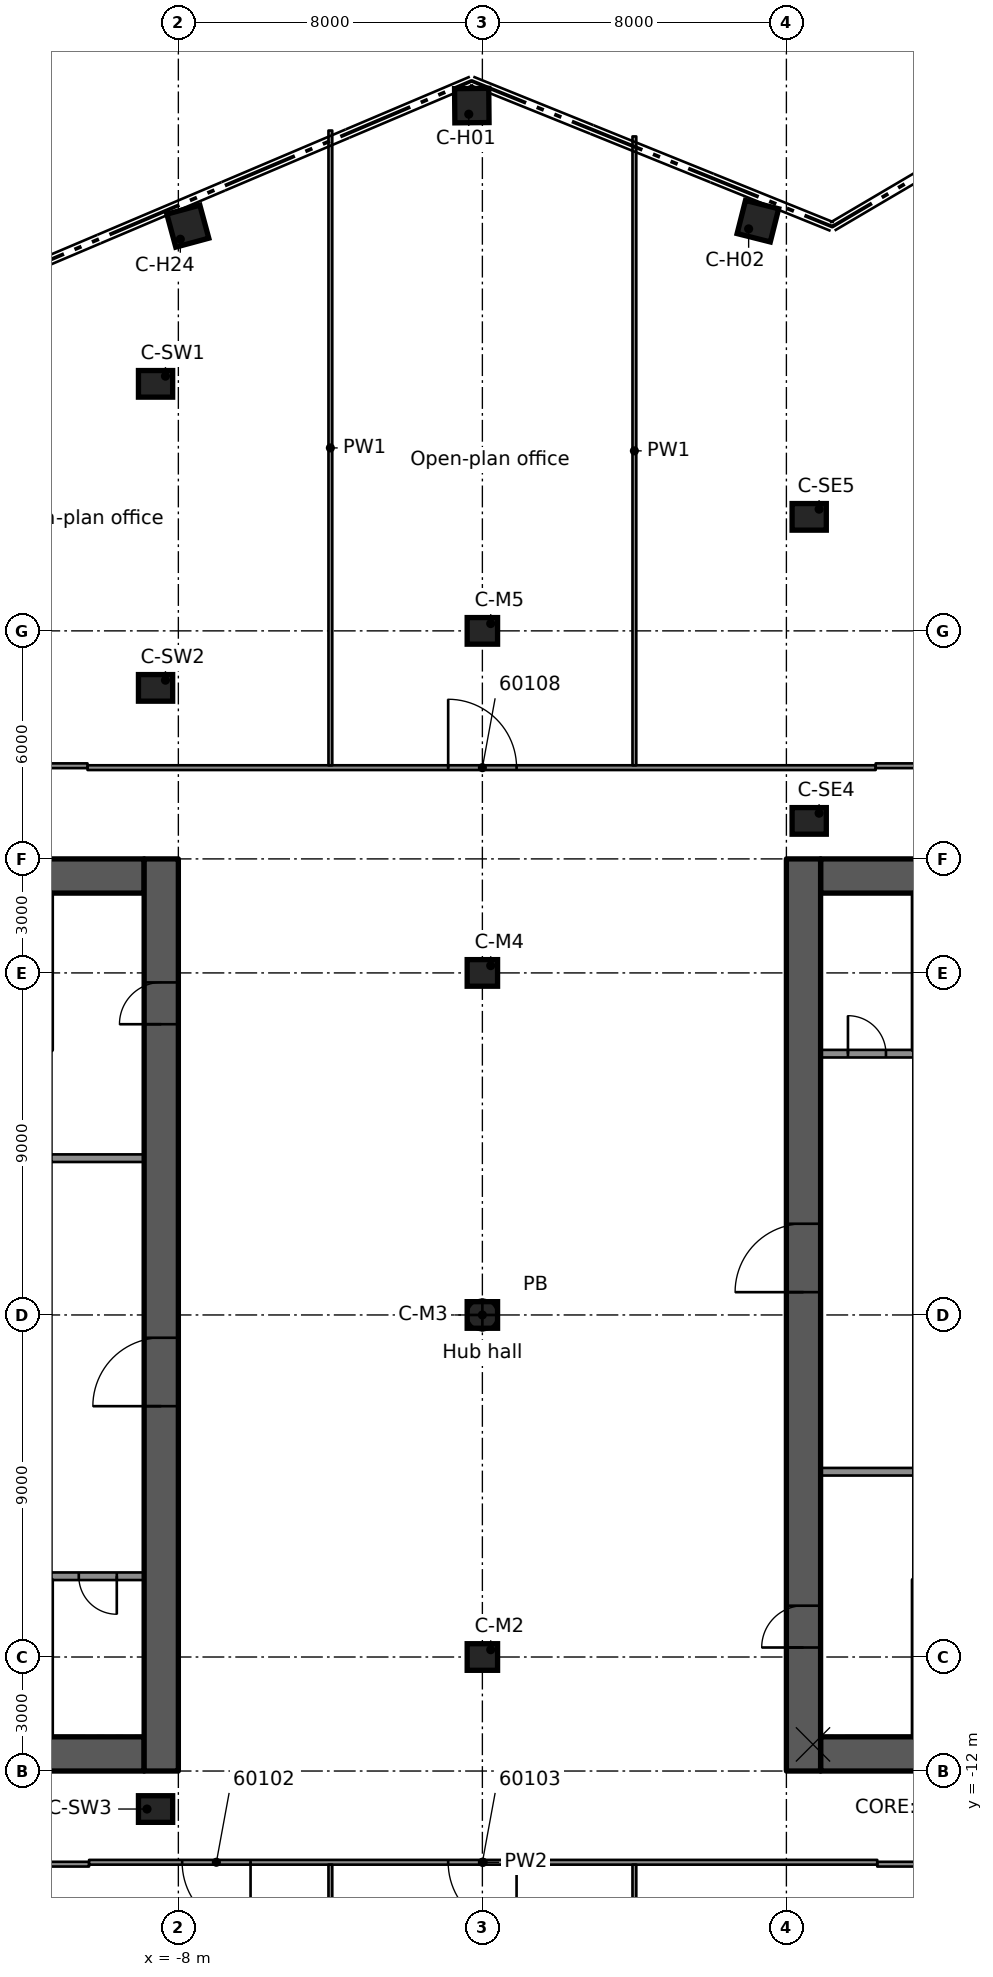
"""IFC4 building model, lengths in metres.
Left out: names, types, materials, properties, quantities, classifications, styles, units other than length and angle.
Written with IfcOpenShell. Run it as: python <this file> out.ifc"""

import sys

from ifc_helpers import new_model, si_unit, direction, frame, frame_2d, origin, origin_2d, place, context, subcontext, project, spatial, rectangle, extrude, element, fill, save


model = new_model("IFC4")
c1 = context("Model", 3, precision=1e-05, world=origin(), true_north=direction((0.0, 1.0)))
c2 = subcontext(c1, "Body", "Model", "MODEL_VIEW")
j1 = project(units=[si_unit("LENGTHUNIT", "METRE"), si_unit("PLANEANGLEUNIT", "RADIAN")], contexts=[c1])
p1 = place(None, origin())
s1 = spatial("IfcSite", under=j1, at=p1, CompositionType="ELEMENT")
p2 = place(p1, origin())
s2 = spatial("IfcBuilding", under=s1, at=p2, CompositionType="ELEMENT")
p3 = place(p2, frame((0.0, 0.0, 292.9)))
s3 = spatial("IfcBuildingStorey", under=s2, at=p3, CompositionType="ELEMENT", Elevation=292.9)
p4 = place(p3, frame((-18.1, 11.55, 0.0), z_axis=(0.0, 0.0, 1.0), x_axis=(1.0, 0.0, 0.0)))
e1 = element("IfcWall", 1, at=p4, inside=s3, PredefinedType="SHEAR", context=c2, shape_type="SweptSolid", body=[
    extrude(rectangle(XDim=9.2, YDim=0.9, at=frame_2d((4.6, 0.0))), origin(), (0.0, 0.0, 1.0), 3.5),
])
p5 = place(p4, frame((5.1, 0.0, 0.0)))
e2 = element("IfcOpeningElement", 2, at=p5, cuts=e1, PredefinedType="OPENING", context=c2, shape_type="SweptSolid", body=[
    extrude(rectangle(XDim=1.1, YDim=2.1, at=frame_2d((0.55, 1.05))), frame((0.0, 0.46, 0.0), z_axis=(0.0, -1.0, 0.0), x_axis=(1.0, 0.0, 0.0)), (0.0, 0.0, 1.0), 0.92),
])
p6 = place(p3, frame((-18.1, -11.55, 0.0), z_axis=(0.0, 0.0, 1.0), x_axis=(1.0, 0.0, 0.0)))
e3 = element("IfcWall", 3, at=p6, inside=s3, PredefinedType="SHEAR", context=c2, shape_type="SweptSolid", body=[
    extrude(rectangle(XDim=9.2, YDim=0.9, at=frame_2d((4.6, 0.0))), origin(), (0.0, 0.0, 1.0), 3.5),
])
p7 = place(p6, frame((5.1, 0.0, 0.0)))
e4 = element("IfcOpeningElement", 4, at=p7, cuts=e3, PredefinedType="OPENING", context=c2, shape_type="SweptSolid", body=[
    extrude(rectangle(XDim=1.1, YDim=2.1, at=frame_2d((0.55, 1.05))), frame((0.0, 0.46, 0.0), z_axis=(0.0, -1.0, 0.0), x_axis=(1.0, 0.0, 0.0)), (0.0, 0.0, 1.0), 0.92),
])
p8 = place(p3, frame((-8.45, -12.0, 0.0), z_axis=(0.0, 0.0, 1.0), x_axis=(0.0, 1.0, 0.0)))
e5 = element("IfcWall", 5, at=p8, inside=s3, PredefinedType="SHEAR", context=c2, shape_type="SweptSolid", body=[
    extrude(rectangle(XDim=24.0, YDim=0.9, at=frame_2d((12.0, 0.0))), origin(), (0.0, 0.0, 1.0), 3.5),
])
p9 = place(p8, frame((9.6, 0.0, 0.0)))
e6 = element("IfcOpeningElement", 6, at=p9, cuts=e5, PredefinedType="OPENING", context=c2, shape_type="SweptSolid", body=[
    extrude(rectangle(XDim=1.8, YDim=2.1, at=frame_2d((0.9, 1.05))), frame((0.0, 0.46, 0.0), z_axis=(0.0, -1.0, 0.0), x_axis=(1.0, 0.0, 0.0)), (0.0, 0.0, 1.0), 0.92),
])
p10 = place(p8, frame((19.65, 0.0, 0.0)))
e7 = element("IfcOpeningElement", 7, at=p10, cuts=e5, PredefinedType="OPENING", context=c2, shape_type="SweptSolid", body=[
    extrude(rectangle(XDim=1.1, YDim=2.1, at=frame_2d((0.55, 1.05))), frame((0.0, 0.46, 0.0), z_axis=(0.0, -1.0, 0.0), x_axis=(1.0, 0.0, 0.0)), (0.0, 0.0, 1.0), 0.92),
])
p11 = place(p3, frame((8.9, 11.55, 0.0), z_axis=(0.0, 0.0, 1.0), x_axis=(1.0, 0.0, 0.0)))
e8 = element("IfcWall", 8, at=p11, inside=s3, PredefinedType="SHEAR", context=c2, shape_type="SweptSolid", body=[
    extrude(rectangle(XDim=9.2, YDim=0.9, at=frame_2d((4.6, 0.0))), origin(), (0.0, 0.0, 1.0), 3.5),
])
p12 = place(p11, frame((3.0, 0.0, 0.0)))
e9 = element("IfcOpeningElement", 9, at=p12, cuts=e8, PredefinedType="OPENING", context=c2, shape_type="SweptSolid", body=[
    extrude(rectangle(XDim=1.1, YDim=2.1, at=frame_2d((0.55, 1.05))), frame((0.0, 0.46, 0.0), z_axis=(0.0, -1.0, 0.0), x_axis=(1.0, 0.0, 0.0)), (0.0, 0.0, 1.0), 0.92),
])
p13 = place(p3, frame((8.9, -11.55, 0.0), z_axis=(0.0, 0.0, 1.0), x_axis=(1.0, 0.0, 0.0)))
e10 = element("IfcWall", 10, at=p13, inside=s3, PredefinedType="SHEAR", context=c2, shape_type="SweptSolid", body=[
    extrude(rectangle(XDim=9.2, YDim=0.9, at=frame_2d((4.6, 0.0))), origin(), (0.0, 0.0, 1.0), 3.5),
])
p14 = place(p13, frame((3.0, 0.0, 0.0)))
e11 = element("IfcOpeningElement", 11, at=p14, cuts=e10, PredefinedType="OPENING", context=c2, shape_type="SweptSolid", body=[
    extrude(rectangle(XDim=1.1, YDim=2.1, at=frame_2d((0.55, 1.05))), frame((0.0, 0.46, 0.0), z_axis=(0.0, -1.0, 0.0), x_axis=(1.0, 0.0, 0.0)), (0.0, 0.0, 1.0), 0.92),
])
p15 = place(p3, frame((8.45, -12.0, 0.0), z_axis=(0.0, 0.0, 1.0), x_axis=(0.0, 1.0, 0.0)))
e12 = element("IfcWall", 12, at=p15, inside=s3, PredefinedType="SHEAR", context=c2, shape_type="SweptSolid", body=[
    extrude(rectangle(XDim=24.0, YDim=0.9, at=frame_2d((12.0, 0.0))), origin(), (0.0, 0.0, 1.0), 3.5),
])
p16 = place(p15, frame((12.6, 0.0, 0.0)))
e13 = element("IfcOpeningElement", 13, at=p16, cuts=e12, PredefinedType="OPENING", context=c2, shape_type="SweptSolid", body=[
    extrude(rectangle(XDim=1.8, YDim=2.1, at=frame_2d((0.9, 1.05))), frame((0.0, 0.46, 0.0), z_axis=(0.0, -1.0, 0.0), x_axis=(1.0, 0.0, 0.0)), (0.0, 0.0, 1.0), 0.92),
])
p17 = place(p15, frame((3.25, 0.0, 0.0)))
e14 = element("IfcOpeningElement", 14, at=p17, cuts=e12, PredefinedType="OPENING", context=c2, shape_type="SweptSolid", body=[
    extrude(rectangle(XDim=1.1, YDim=2.1, at=frame_2d((0.55, 1.05))), frame((0.0, 0.46, 0.0), z_axis=(0.0, -1.0, 0.0), x_axis=(1.0, 0.0, 0.0)), (0.0, 0.0, 1.0), 0.92),
])
for number, where, z_axis, x_axis in (
    (15, (-0.278, 31.821, 0.0), (0.0, 0.0, 1.0), (-0.009, 1.0, 0.0)),
    (16, (7.25, 28.78, 0.0), (0.0, 0.0, 1.0), (0.244, 0.97, 0.0)),
    (17, (-7.751, 28.649, 0.0), (0.0, 0.0, 1.0), (-0.261, 0.965, 0.0)),
):
    element("IfcColumn", number, at=place(p3, frame(where, z_axis=z_axis, x_axis=x_axis)), inside=s3, PredefinedType="COLUMN", context=c2, shape_type="SweptSolid", body=[
        extrude(rectangle(XDim=0.9, YDim=0.9, at=origin_2d()), origin(), (0.0, 0.0, 1.0), 3.5),
    ])
for number, where, z_axis, x_axis in (
    (18, (0.0, -9.0, 0.0), (0.0, 0.0, 1.0), (1.0, 0.0, 0.0)),
    (19, (0.0, 0.0, 0.0), (0.0, 0.0, 1.0), (1.0, 0.0, 0.0)),
    (20, (0.0, 9.0, 0.0), (0.0, 0.0, 1.0), (1.0, 0.0, 0.0)),
    (21, (0.0, 18.0, 0.0), (0.0, 0.0, 1.0), (1.0, 0.0, 0.0)),
):
    element("IfcColumn", number, at=place(p3, frame(where, z_axis=z_axis, x_axis=x_axis)), inside=s3, PredefinedType="COLUMN", context=c2, shape_type="SweptSolid", body=[
        extrude(rectangle(XDim=0.8, YDim=0.7, at=origin_2d()), origin(), (0.0, 0.0, 1.0), 3.5),
    ])
for number, where, z_axis, x_axis in (
    (22, (8.6, 13.0, 0.0), (0.0, 0.0, 1.0), (1.0, 0.0, 0.0)),
    (23, (8.6, 21.0, 0.0), (0.0, 0.0, 1.0), (1.0, 0.0, 0.0)),
    (24, (-8.6, 24.5, 0.0), (0.0, 0.0, 1.0), (1.0, 0.0, 0.0)),
    (25, (-8.6, 16.5, 0.0), (0.0, 0.0, 1.0), (1.0, 0.0, 0.0)),
    (26, (-8.6, -13.0, 0.0), (0.0, 0.0, 1.0), (1.0, 0.0, 0.0)),
):
    element("IfcColumn", number, at=place(p3, frame(where, z_axis=z_axis, x_axis=x_axis)), inside=s3, PredefinedType="COLUMN", context=c2, shape_type="SweptSolid", body=[
        extrude(rectangle(XDim=0.9, YDim=0.7, at=origin_2d()), origin(), (0.0, 0.0, 1.0), 3.5),
    ])
p18 = place(p3, frame((-8.9, 4.125, 0.0), z_axis=(0.0, 0.0, 1.0), x_axis=(-1.0, 0.0, 0.0)))
e27 = element("IfcWall", 27, at=p18, inside=s3, PredefinedType="PARTITIONING", context=c2, shape_type="SweptSolid", body=[
    extrude(rectangle(XDim=2.44, YDim=0.2, at=frame_2d((1.22, 0.0))), origin(), (0.0, 0.0, 1.0), 3.09),
])
p19 = place(p3, frame((-8.9, -6.875, 0.0), z_axis=(0.0, 0.0, 1.0), x_axis=(-1.0, 0.0, 0.0)))
e28 = element("IfcWall", 28, at=p19, inside=s3, PredefinedType="PARTITIONING", context=c2, shape_type="SweptSolid", body=[
    extrude(rectangle(XDim=2.44, YDim=0.2, at=frame_2d((1.22, 0.0))), origin(), (0.0, 0.0, 1.0), 3.09),
])
p20 = place(p19, frame((0.72, 0.0, 0.0)))
e29 = element("IfcOpeningElement", 29, at=p20, cuts=e28, PredefinedType="OPENING", context=c2, shape_type="SweptSolid", body=[
    extrude(rectangle(XDim=1.0, YDim=2.1, at=frame_2d((0.5, 1.05))), frame((0.0, 0.11, 0.0), z_axis=(0.0, -1.0, 0.0), x_axis=(1.0, 0.0, 0.0)), (0.0, 0.0, 1.0), 0.22),
])
p21 = place(p3, frame((8.9, -4.125, 0.0), z_axis=(0.0, 0.0, 1.0), x_axis=(1.0, 0.0, 0.0)))
e30 = element("IfcWall", 30, at=p21, inside=s3, PredefinedType="PARTITIONING", context=c2, shape_type="SweptSolid", body=[
    extrude(rectangle(XDim=2.44, YDim=0.2, at=frame_2d((1.22, 0.0))), origin(), (0.0, 0.0, 1.0), 3.09),
])
p22 = place(p3, frame((8.9, 6.875, 0.0), z_axis=(0.0, 0.0, 1.0), x_axis=(1.0, 0.0, 0.0)))
e31 = element("IfcWall", 31, at=p22, inside=s3, PredefinedType="PARTITIONING", context=c2, shape_type="SweptSolid", body=[
    extrude(rectangle(XDim=2.44, YDim=0.2, at=frame_2d((1.22, 0.0))), origin(), (0.0, 0.0, 1.0), 3.09),
])
p23 = place(p22, frame((0.72, 0.0, 0.0)))
e32 = element("IfcOpeningElement", 32, at=p23, cuts=e31, PredefinedType="OPENING", context=c2, shape_type="SweptSolid", body=[
    extrude(rectangle(XDim=1.0, YDim=2.1, at=frame_2d((0.5, 1.05))), frame((0.0, 0.11, 0.0), z_axis=(0.0, -1.0, 0.0), x_axis=(1.0, 0.0, 0.0)), (0.0, 0.0, 1.0), 0.22),
])
p24 = place(p3, frame((-10.35, -14.451, 0.0), z_axis=(0.0, 0.0, 1.0), x_axis=(-1.0, 0.0, 0.0)))
e33 = element("IfcWall", 33, at=p24, inside=s3, PredefinedType="PARTITIONING", context=c2, shape_type="SweptSolid", body=[
    extrude(rectangle(XDim=11.037, YDim=0.125, at=frame_2d((5.519, 0.0))), origin(), (0.0, 0.0, 1.0), 3.08),
])
p25 = place(p24, frame((4.6, 0.0, 0.0)))
e34 = element("IfcOpeningElement", 34, at=p25, cuts=e33, PredefinedType="OPENING", context=c2, shape_type="SweptSolid", body=[
    extrude(rectangle(XDim=1.8, YDim=2.1, at=frame_2d((0.9, 1.05))), frame((0.0, 0.073, 0.0), z_axis=(0.0, -1.0, 0.0), x_axis=(1.0, 0.0, 0.0)), (0.0, 0.0, 1.0), 0.145),
])
p26 = place(p3, frame((21.387, -14.451, 0.0), z_axis=(0.0, 0.0, 1.0), x_axis=(-1.0, 0.0, 0.0)))
e35 = element("IfcWall", 35, at=p26, inside=s3, PredefinedType="PARTITIONING", context=c2, shape_type="SweptSolid", body=[
    extrude(rectangle(XDim=10.996, YDim=0.125, at=frame_2d((5.498, 0.0))), origin(), (0.0, 0.0, 1.0), 3.08),
])
p27 = place(p26, frame((5.038, 0.0, 0.0)))
e36 = element("IfcOpeningElement", 36, at=p27, cuts=e35, PredefinedType="OPENING", context=c2, shape_type="SweptSolid", body=[
    extrude(rectangle(XDim=0.9, YDim=2.1, at=frame_2d((0.45, 1.05))), frame((0.0, 0.073, 0.0), z_axis=(0.0, -1.0, 0.0), x_axis=(1.0, 0.0, 0.0)), (0.0, 0.0, 1.0), 0.145),
])
p28 = place(p3, frame((10.391, -14.401, 0.0), z_axis=(0.0, 0.0, 1.0), x_axis=(-1.0, 0.0, 0.0)))
e37 = element("IfcWall", 37, at=p28, inside=s3, PredefinedType="PARTITIONING", context=c2, shape_type="SweptSolid", body=[
    extrude(rectangle(XDim=20.74, YDim=0.125, at=frame_2d((10.37, 0.0))), origin(), (0.0, 0.0, 1.0), 3.08),
])
p29 = place(p28, frame((16.491, 0.0, 0.0)))
e38 = element("IfcOpeningElement", 38, at=p29, cuts=e37, PredefinedType="OPENING", context=c2, shape_type="SweptSolid", body=[
    extrude(rectangle(XDim=1.8, YDim=2.1, at=frame_2d((0.9, 1.05))), frame((0.0, 0.073, 0.0), z_axis=(0.0, -1.0, 0.0), x_axis=(1.0, 0.0, 0.0)), (0.0, 0.0, 1.0), 0.145),
])
p30 = place(p28, frame((9.491, 0.0, 0.0)))
e39 = element("IfcOpeningElement", 39, at=p30, cuts=e37, PredefinedType="OPENING", context=c2, shape_type="SweptSolid", body=[
    extrude(rectangle(XDim=1.8, YDim=2.1, at=frame_2d((0.9, 1.05))), frame((0.0, 0.073, 0.0), z_axis=(0.0, -1.0, 0.0), x_axis=(1.0, 0.0, 0.0)), (0.0, 0.0, 1.0), 0.145),
])
p31 = place(p3, frame((-10.39, 14.401, 0.0), z_axis=(0.0, 0.0, 1.0), x_axis=(1.0, 0.0, 0.0)))
e40 = element("IfcWall", 40, at=p31, inside=s3, PredefinedType="PARTITIONING", context=c2, shape_type="SweptSolid", body=[
    extrude(rectangle(XDim=20.739, YDim=0.125, at=frame_2d((10.37, 0.0))), origin(), (0.0, 0.0, 1.0), 3.08),
])
p32 = place(p31, frame((9.49, 0.0, 0.0)))
e41 = element("IfcOpeningElement", 41, at=p32, cuts=e40, PredefinedType="OPENING", context=c2, shape_type="SweptSolid", body=[
    extrude(rectangle(XDim=1.8, YDim=2.1, at=frame_2d((0.9, 1.05))), frame((0.0, 0.073, 0.0), z_axis=(0.0, -1.0, 0.0), x_axis=(1.0, 0.0, 0.0)), (0.0, 0.0, 1.0), 0.145),
])
p33 = place(p3, frame((-21.387, 14.451, 0.0), z_axis=(0.0, 0.0, 1.0), x_axis=(1.0, 0.0, 0.0)))
e42 = element("IfcWall", 42, at=p33, inside=s3, PredefinedType="PARTITIONING", context=c2, shape_type="SweptSolid", body=[
    extrude(rectangle(XDim=10.996, YDim=0.125, at=frame_2d((5.498, 0.0))), origin(), (0.0, 0.0, 1.0), 3.08),
])
p34 = place(p33, frame((4.538, 0.0, 0.0)))
e43 = element("IfcOpeningElement", 43, at=p34, cuts=e42, PredefinedType="OPENING", context=c2, shape_type="SweptSolid", body=[
    extrude(rectangle(XDim=1.8, YDim=2.1, at=frame_2d((0.9, 1.05))), frame((0.0, 0.073, 0.0), z_axis=(0.0, -1.0, 0.0), x_axis=(1.0, 0.0, 0.0)), (0.0, 0.0, 1.0), 0.145),
])
p35 = place(p3, frame((10.35, 14.451, 0.0), z_axis=(0.0, 0.0, 1.0), x_axis=(1.0, 0.0, 0.0)))
e44 = element("IfcWall", 44, at=p35, inside=s3, PredefinedType="PARTITIONING", context=c2, shape_type="SweptSolid", body=[
    extrude(rectangle(XDim=11.037, YDim=0.125, at=frame_2d((5.519, 0.0))), origin(), (0.0, 0.0, 1.0), 3.08),
])
p36 = place(p35, frame((4.6, 0.0, 0.0)))
e45 = element("IfcOpeningElement", 45, at=p36, cuts=e44, PredefinedType="OPENING", context=c2, shape_type="SweptSolid", body=[
    extrude(rectangle(XDim=1.8, YDim=2.1, at=frame_2d((0.9, 1.05))), frame((0.0, 0.073, 0.0), z_axis=(0.0, -1.0, 0.0), x_axis=(1.0, 0.0, 0.0)), (0.0, 0.0, 1.0), 0.145),
])
p37 = place(p3, frame((4.0, -34.952, 0.0), z_axis=(0.0, 0.0, 1.0), x_axis=(0.0, 1.0, 0.0)))
e46 = element("IfcWall", 46, at=p37, inside=s3, PredefinedType="PARTITIONING", context=c2, shape_type="SweptSolid", body=[
    extrude(rectangle(XDim=20.489, YDim=0.1, at=frame_2d((10.245, 0.0))), origin(), (0.0, 0.0, 1.0), 2.445),
])
p38 = place(p3, frame((4.0, 14.463, 0.0), z_axis=(0.0, 0.0, 1.0), x_axis=(0.0, 1.0, 0.0)))
e47 = element("IfcWall", 47, at=p38, inside=s3, PredefinedType="PARTITIONING", context=c2, shape_type="SweptSolid", body=[
    extrude(rectangle(XDim=16.547, YDim=0.1, at=frame_2d((8.273, 0.0))), origin(), (0.0, 0.0, 1.0), 3.08),
])
p39 = place(p3, frame((-4.0, -36.532, 0.0), z_axis=(0.0, 0.0, 1.0), x_axis=(0.0, 1.0, 0.0)))
e48 = element("IfcWall", 48, at=p39, inside=s3, PredefinedType="PARTITIONING", context=c2, shape_type="SweptSolid", body=[
    extrude(rectangle(XDim=22.069, YDim=0.1, at=frame_2d((11.035, 0.0))), origin(), (0.0, 0.0, 1.0), 2.445),
])
p40 = place(p3, frame((-4.0, 14.463, 0.0), z_axis=(0.0, 0.0, 1.0), x_axis=(0.0, 1.0, 0.0)))
e49 = element("IfcWall", 49, at=p40, inside=s3, PredefinedType="PARTITIONING", context=c2, shape_type="SweptSolid", body=[
    extrude(rectangle(XDim=16.702, YDim=0.1, at=frame_2d((8.351, 0.0))), origin(), (0.0, 0.0, 1.0), 3.08),
])
p41 = place(p9, origin())
e50 = element("IfcDoor", 50, at=p41, inside=s3, OperationType="SINGLE_SWING_LEFT", PredefinedType="DOOR", context=c2, shape_type="SweptSolid", body=[
    extrude(rectangle(XDim=1.8, YDim=2.1, at=frame_2d((0.9, 1.05))), frame((0.0, 0.025, 0.0), z_axis=(0.0, -1.0, 0.0), x_axis=(1.0, 0.0, 0.0)), (0.0, 0.0, 1.0), 0.05),
])
fill(e6, e50)
p42 = place(p10, origin())
e51 = element("IfcDoor", 51, at=p42, inside=s3, OperationType="SINGLE_SWING_RIGHT", PredefinedType="DOOR", context=c2, shape_type="SweptSolid", body=[
    extrude(rectangle(XDim=1.1, YDim=2.1, at=frame_2d((0.55, 1.05))), frame((0.0, 0.025, 0.0), z_axis=(0.0, -1.0, 0.0), x_axis=(1.0, 0.0, 0.0)), (0.0, 0.0, 1.0), 0.05),
])
fill(e7, e51)
p43 = place(p20, origin())
e52 = element("IfcDoor", 52, at=p43, inside=s3, OperationType="SINGLE_SWING_RIGHT", PredefinedType="DOOR", context=c2, shape_type="SweptSolid", body=[
    extrude(rectangle(XDim=1.0, YDim=2.1, at=frame_2d((0.5, 1.05))), frame((0.0, 0.025, 0.0), z_axis=(0.0, -1.0, 0.0), x_axis=(1.0, 0.0, 0.0)), (0.0, 0.0, 1.0), 0.05),
])
fill(e29, e52)
p44 = place(p16, origin())
e53 = element("IfcDoor", 53, at=p44, inside=s3, OperationType="SINGLE_SWING_RIGHT", PredefinedType="DOOR", context=c2, shape_type="SweptSolid", body=[
    extrude(rectangle(XDim=1.8, YDim=2.1, at=frame_2d((0.9, 1.05))), frame((0.0, 0.025, 0.0), z_axis=(0.0, -1.0, 0.0), x_axis=(1.0, 0.0, 0.0)), (0.0, 0.0, 1.0), 0.05),
])
fill(e13, e53)
p45 = place(p17, origin())
e54 = element("IfcDoor", 54, at=p45, inside=s3, OperationType="SINGLE_SWING_LEFT", PredefinedType="DOOR", context=c2, shape_type="SweptSolid", body=[
    extrude(rectangle(XDim=1.1, YDim=2.1, at=frame_2d((0.55, 1.05))), frame((0.0, 0.025, 0.0), z_axis=(0.0, -1.0, 0.0), x_axis=(1.0, 0.0, 0.0)), (0.0, 0.0, 1.0), 0.05),
])
fill(e14, e54)
p46 = place(p23, origin())
e55 = element("IfcDoor", 55, at=p46, inside=s3, OperationType="SINGLE_SWING_RIGHT", PredefinedType="DOOR", context=c2, shape_type="SweptSolid", body=[
    extrude(rectangle(XDim=1.0, YDim=2.1, at=frame_2d((0.5, 1.05))), frame((0.0, 0.025, 0.0), z_axis=(0.0, -1.0, 0.0), x_axis=(1.0, 0.0, 0.0)), (0.0, 0.0, 1.0), 0.05),
])
fill(e32, e55)
p47 = place(p29, origin())
e56 = element("IfcDoor", 56, at=p47, inside=s3, OperationType="DOUBLE_DOOR_SINGLE_SWING", PredefinedType="DOOR", context=c2, shape_type="SweptSolid", body=[
    extrude(rectangle(XDim=1.8, YDim=2.1, at=frame_2d((0.9, 1.05))), frame((0.0, 0.025, 0.0), z_axis=(0.0, -1.0, 0.0), x_axis=(1.0, 0.0, 0.0)), (0.0, 0.0, 1.0), 0.05),
])
fill(e38, e56)
p48 = place(p30, origin())
e57 = element("IfcDoor", 57, at=p48, inside=s3, OperationType="DOUBLE_DOOR_SINGLE_SWING", PredefinedType="DOOR", context=c2, shape_type="SweptSolid", body=[
    extrude(rectangle(XDim=1.8, YDim=2.1, at=frame_2d((0.9, 1.05))), frame((0.0, 0.025, 0.0), z_axis=(0.0, -1.0, 0.0), x_axis=(1.0, 0.0, 0.0)), (0.0, 0.0, 1.0), 0.05),
])
fill(e39, e57)
p49 = place(p32, origin())
e58 = element("IfcDoor", 58, at=p49, inside=s3, OperationType="DOUBLE_DOOR_SINGLE_SWING", PredefinedType="DOOR", context=c2, shape_type="SweptSolid", body=[
    extrude(rectangle(XDim=1.8, YDim=2.1, at=frame_2d((0.9, 1.05))), frame((0.0, 0.025, 0.0), z_axis=(0.0, -1.0, 0.0), x_axis=(1.0, 0.0, 0.0)), (0.0, 0.0, 1.0), 0.05),
])
fill(e41, e58)
save(model, sys.argv[1])
